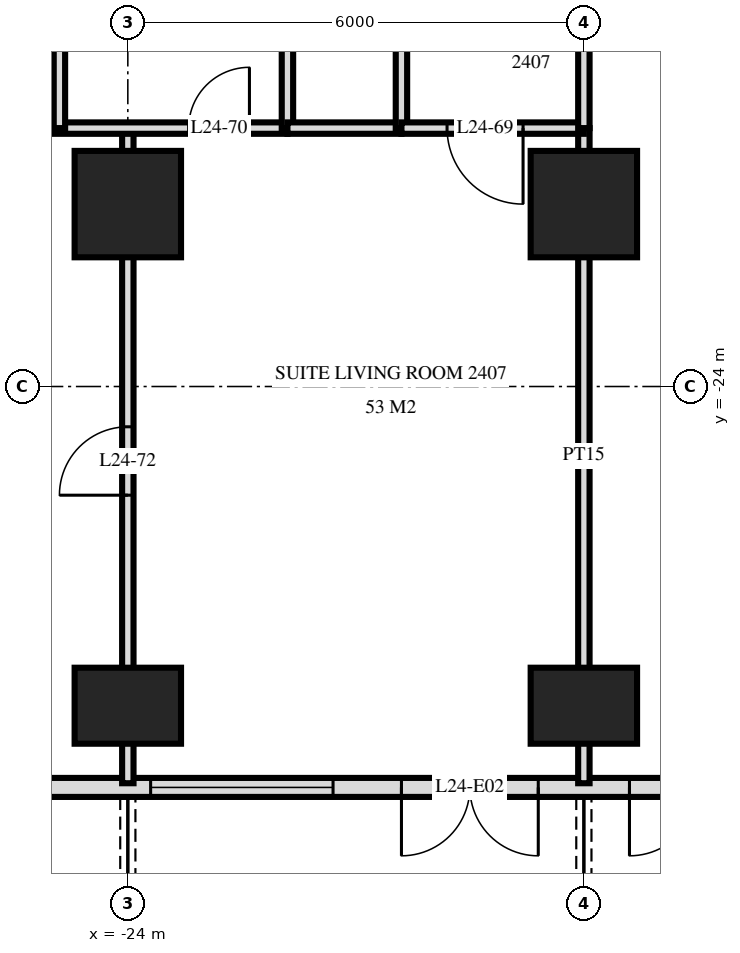
"""IFC4 building model, lengths in metres.
Left out: names, types, materials, properties, quantities, classifications, styles, units other than length and angle.
Written with IfcOpenShell. Run it as: python <this file> out.ifc"""

import sys

from ifc_helpers import new_model, si_unit, direction, frame, frame_2d, origin, origin_2d, place, context, subcontext, project, spatial, rectangle, extrude, element, fill, save


model = new_model("IFC4")
c1 = context("Model", 3, precision=1e-05, world=origin(), true_north=direction((0.0, 1.0)))
c2 = subcontext(c1, "Body", "Model", "MODEL_VIEW")
j1 = project(units=[si_unit("LENGTHUNIT", "METRE"), si_unit("PLANEANGLEUNIT", "RADIAN")], contexts=[c1])
p1 = place(None, origin())
s1 = spatial("IfcSite", under=j1, at=p1, CompositionType="ELEMENT")
p2 = place(p1, origin())
s2 = spatial("IfcBuilding", under=s1, at=p2, CompositionType="ELEMENT")
p3 = place(p2, frame((0.0, 0.0, 96.0)))
s3 = spatial("IfcBuildingStorey", under=s2, at=p3, CompositionType="ELEMENT", Elevation=96.0)
p4 = place(p3, frame((-24.0, -28.2, 0.0), z_axis=(0.0, 0.0, 1.0), x_axis=(1.0, 0.0, 0.0)))
e1 = element("IfcColumn", 1, at=p4, inside=s3, PredefinedType="COLUMN", context=c2, shape_type="SweptSolid", body=[
    extrude(rectangle(XDim=1.4, YDim=1.0, at=origin_2d()), origin(), (0.0, 0.0, 1.0), 3.6),
])
p5 = place(p3, frame((-24.0, -21.6, 0.0), z_axis=(0.0, 0.0, 1.0), x_axis=(1.0, 0.0, 0.0)))
e2 = element("IfcColumn", 2, at=p5, inside=s3, PredefinedType="COLUMN", context=c2, shape_type="SweptSolid", body=[
    extrude(rectangle(XDim=1.4, YDim=1.4, at=origin_2d()), origin(), (0.0, 0.0, 1.0), 3.6),
])
p6 = place(p3, frame((-18.0, -28.2, 0.0), z_axis=(0.0, 0.0, 1.0), x_axis=(1.0, 0.0, 0.0)))
e3 = element("IfcColumn", 3, at=p6, inside=s3, PredefinedType="COLUMN", context=c2, shape_type="SweptSolid", body=[
    extrude(rectangle(XDim=1.4, YDim=1.0, at=origin_2d()), origin(), (0.0, 0.0, 1.0), 3.6),
])
p7 = place(p3, frame((-18.0, -21.6, 0.0), z_axis=(0.0, 0.0, 1.0), x_axis=(1.0, 0.0, 0.0)))
e4 = element("IfcColumn", 4, at=p7, inside=s3, PredefinedType="COLUMN", context=c2, shape_type="SweptSolid", body=[
    extrude(rectangle(XDim=1.4, YDim=1.4, at=origin_2d()), origin(), (0.0, 0.0, 1.0), 3.6),
])
p8 = place(p3, frame((-28.775, -29.275, 0.0), z_axis=(0.0, 0.0, 1.0), x_axis=(1.0, 0.0, 0.0)))
e5 = element("IfcWall", 5, at=p8, inside=s3, PredefinedType="SOLIDWALL", context=c2, shape_type="SweptSolid", body=[
    extrude(rectangle(XDim=57.551, YDim=0.25, at=frame_2d((28.775, 0.0))), origin(), (0.0, 0.0, 1.0), 3.32),
])
p9 = place(p8, frame((0.575, 0.0, 0.0)))
e6 = element("IfcOpeningElement", 6, at=p9, cuts=e5, PredefinedType="OPENING", context=c2, shape_type="SweptSolid", body=[
    extrude(rectangle(XDim=1.8, YDim=2.4, at=frame_2d((0.9, 1.2))), frame((0.0, 0.135, 0.0), z_axis=(0.0, -1.0, 0.0), x_axis=(1.0, 0.0, 0.0)), (0.0, 0.0, 1.0), 0.27),
])
p10 = place(p8, frame((5.075, 0.0, 0.3)))
e7 = element("IfcOpeningElement", 7, at=p10, cuts=e5, PredefinedType="OPENING", context=c2, shape_type="SweptSolid", body=[
    extrude(rectangle(XDim=2.4, YDim=2.1, at=frame_2d((1.2, 1.05))), frame((0.0, 0.135, 0.0), z_axis=(0.0, -1.0, 0.0), x_axis=(1.0, 0.0, 0.0)), (0.0, 0.0, 1.0), 0.27),
])
p11 = place(p8, frame((8.375, 0.0, 0.0)))
e8 = element("IfcOpeningElement", 8, at=p11, cuts=e5, PredefinedType="OPENING", context=c2, shape_type="SweptSolid", body=[
    extrude(rectangle(XDim=1.8, YDim=2.4, at=frame_2d((0.9, 1.2))), frame((0.0, 0.135, 0.0), z_axis=(0.0, -1.0, 0.0), x_axis=(1.0, 0.0, 0.0)), (0.0, 0.0, 1.0), 0.27),
])
p12 = place(p8, frame((11.375, 0.0, 0.0)))
e9 = element("IfcOpeningElement", 9, at=p12, cuts=e5, PredefinedType="OPENING", context=c2, shape_type="SweptSolid", body=[
    extrude(rectangle(XDim=1.8, YDim=2.4, at=frame_2d((0.9, 1.2))), frame((0.0, 0.135, 0.0), z_axis=(0.0, -1.0, 0.0), x_axis=(1.0, 0.0, 0.0)), (0.0, 0.0, 1.0), 0.27),
])
p13 = place(p8, frame((14.075, 0.0, 0.3)))
e10 = element("IfcOpeningElement", 10, at=p13, cuts=e5, PredefinedType="OPENING", context=c2, shape_type="SweptSolid", body=[
    extrude(rectangle(XDim=2.4, YDim=2.1, at=frame_2d((1.2, 1.05))), frame((0.0, 0.135, 0.0), z_axis=(0.0, -1.0, 0.0), x_axis=(1.0, 0.0, 0.0)), (0.0, 0.0, 1.0), 0.27),
])
p14 = place(p8, frame((17.375, 0.0, 0.0)))
e11 = element("IfcOpeningElement", 11, at=p14, cuts=e5, PredefinedType="OPENING", context=c2, shape_type="SweptSolid", body=[
    extrude(rectangle(XDim=1.8, YDim=2.4, at=frame_2d((0.9, 1.2))), frame((0.0, 0.135, 0.0), z_axis=(0.0, -1.0, 0.0), x_axis=(1.0, 0.0, 0.0)), (0.0, 0.0, 1.0), 0.27),
])
p15 = place(p8, frame((20.075, 0.0, 0.3)))
e12 = element("IfcOpeningElement", 12, at=p15, cuts=e5, PredefinedType="OPENING", context=c2, shape_type="SweptSolid", body=[
    extrude(rectangle(XDim=2.4, YDim=2.1, at=frame_2d((1.2, 1.05))), frame((0.0, 0.135, 0.0), z_axis=(0.0, -1.0, 0.0), x_axis=(1.0, 0.0, 0.0)), (0.0, 0.0, 1.0), 0.27),
])
p16 = place(p8, frame((23.075, 0.0, 0.3)))
e13 = element("IfcOpeningElement", 13, at=p16, cuts=e5, PredefinedType="OPENING", context=c2, shape_type="SweptSolid", body=[
    extrude(rectangle(XDim=2.4, YDim=2.1, at=frame_2d((1.2, 1.05))), frame((0.0, 0.135, 0.0), z_axis=(0.0, -1.0, 0.0), x_axis=(1.0, 0.0, 0.0)), (0.0, 0.0, 1.0), 0.27),
])
p17 = place(p8, frame((26.375, 0.0, 0.0)))
e14 = element("IfcOpeningElement", 14, at=p17, cuts=e5, PredefinedType="OPENING", context=c2, shape_type="SweptSolid", body=[
    extrude(rectangle(XDim=1.8, YDim=2.4, at=frame_2d((0.9, 1.2))), frame((0.0, 0.135, 0.0), z_axis=(0.0, -1.0, 0.0), x_axis=(1.0, 0.0, 0.0)), (0.0, 0.0, 1.0), 0.27),
])
p18 = place(p8, frame((29.375, 0.0, 0.0)))
e15 = element("IfcOpeningElement", 15, at=p18, cuts=e5, PredefinedType="OPENING", context=c2, shape_type="SweptSolid", body=[
    extrude(rectangle(XDim=1.8, YDim=2.4, at=frame_2d((0.9, 1.2))), frame((0.0, 0.135, 0.0), z_axis=(0.0, -1.0, 0.0), x_axis=(1.0, 0.0, 0.0)), (0.0, 0.0, 1.0), 0.27),
])
p19 = place(p8, frame((32.075, 0.0, 0.3)))
e16 = element("IfcOpeningElement", 16, at=p19, cuts=e5, PredefinedType="OPENING", context=c2, shape_type="SweptSolid", body=[
    extrude(rectangle(XDim=2.4, YDim=2.1, at=frame_2d((1.2, 1.05))), frame((0.0, 0.135, 0.0), z_axis=(0.0, -1.0, 0.0), x_axis=(1.0, 0.0, 0.0)), (0.0, 0.0, 1.0), 0.27),
])
p20 = place(p8, frame((35.375, 0.0, 0.0)))
e17 = element("IfcOpeningElement", 17, at=p20, cuts=e5, PredefinedType="OPENING", context=c2, shape_type="SweptSolid", body=[
    extrude(rectangle(XDim=1.8, YDim=2.4, at=frame_2d((0.9, 1.2))), frame((0.0, 0.135, 0.0), z_axis=(0.0, -1.0, 0.0), x_axis=(1.0, 0.0, 0.0)), (0.0, 0.0, 1.0), 0.27),
])
p21 = place(p8, frame((38.075, 0.0, 0.3)))
e18 = element("IfcOpeningElement", 18, at=p21, cuts=e5, PredefinedType="OPENING", context=c2, shape_type="SweptSolid", body=[
    extrude(rectangle(XDim=2.4, YDim=2.1, at=frame_2d((1.2, 1.05))), frame((0.0, 0.135, 0.0), z_axis=(0.0, -1.0, 0.0), x_axis=(1.0, 0.0, 0.0)), (0.0, 0.0, 1.0), 0.27),
])
p22 = place(p8, frame((41.075, 0.0, 0.3)))
e19 = element("IfcOpeningElement", 19, at=p22, cuts=e5, PredefinedType="OPENING", context=c2, shape_type="SweptSolid", body=[
    extrude(rectangle(XDim=2.4, YDim=2.1, at=frame_2d((1.2, 1.05))), frame((0.0, 0.135, 0.0), z_axis=(0.0, -1.0, 0.0), x_axis=(1.0, 0.0, 0.0)), (0.0, 0.0, 1.0), 0.27),
])
p23 = place(p8, frame((44.375, 0.0, 0.0)))
e20 = element("IfcOpeningElement", 20, at=p23, cuts=e5, PredefinedType="OPENING", context=c2, shape_type="SweptSolid", body=[
    extrude(rectangle(XDim=1.8, YDim=2.4, at=frame_2d((0.9, 1.2))), frame((0.0, 0.135, 0.0), z_axis=(0.0, -1.0, 0.0), x_axis=(1.0, 0.0, 0.0)), (0.0, 0.0, 1.0), 0.27),
])
p24 = place(p8, frame((47.075, 0.0, 0.3)))
e21 = element("IfcOpeningElement", 21, at=p24, cuts=e5, PredefinedType="OPENING", context=c2, shape_type="SweptSolid", body=[
    extrude(rectangle(XDim=2.4, YDim=2.1, at=frame_2d((1.2, 1.05))), frame((0.0, 0.135, 0.0), z_axis=(0.0, -1.0, 0.0), x_axis=(1.0, 0.0, 0.0)), (0.0, 0.0, 1.0), 0.27),
])
p25 = place(p8, frame((50.375, 0.0, 0.0)))
e22 = element("IfcOpeningElement", 22, at=p25, cuts=e5, PredefinedType="OPENING", context=c2, shape_type="SweptSolid", body=[
    extrude(rectangle(XDim=1.8, YDim=2.4, at=frame_2d((0.9, 1.2))), frame((0.0, 0.135, 0.0), z_axis=(0.0, -1.0, 0.0), x_axis=(1.0, 0.0, 0.0)), (0.0, 0.0, 1.0), 0.27),
])
p26 = place(p8, frame((53.375, 0.0, 0.0)))
e23 = element("IfcOpeningElement", 23, at=p26, cuts=e5, PredefinedType="OPENING", context=c2, shape_type="SweptSolid", body=[
    extrude(rectangle(XDim=1.8, YDim=2.4, at=frame_2d((0.9, 1.2))), frame((0.0, 0.135, 0.0), z_axis=(0.0, -1.0, 0.0), x_axis=(1.0, 0.0, 0.0)), (0.0, 0.0, 1.0), 0.27),
])
p27 = place(p3, frame((-18.0, -20.6, 0.0), z_axis=(0.0, 0.0, 1.0), x_axis=(0.0, 1.0, 0.0)))
e24 = element("IfcWall", 24, at=p27, inside=s3, PredefinedType="PARTITIONING", context=c2, shape_type="SweptSolid", body=[
    extrude(rectangle(XDim=3.6, YDim=0.15, at=frame_2d((1.8, 0.0))), origin(), (0.0, 0.0, 1.0), 3.32),
])
p28 = place(p3, frame((-18.0, -29.22, 0.0), z_axis=(0.0, 0.0, 1.0), x_axis=(0.0, 1.0, 0.0)))
e25 = element("IfcWall", 25, at=p28, inside=s3, PredefinedType="PARTITIONING", context=c2, shape_type="SweptSolid", body=[
    extrude(rectangle(XDim=8.62, YDim=0.15, at=frame_2d((4.31, 0.0))), origin(), (0.0, 0.0, 1.0), 3.32),
])
p29 = place(p3, frame((-20.4, -20.6, 0.0), z_axis=(0.0, 0.0, 1.0), x_axis=(0.0, 1.0, 0.0)))
e26 = element("IfcWall", 26, at=p29, inside=s3, PredefinedType="PARTITIONING", context=c2, shape_type="SweptSolid", body=[
    extrude(rectangle(XDim=3.6, YDim=0.15, at=frame_2d((1.8, 0.0))), origin(), (0.0, 0.0, 1.0), 3.32),
])
p30 = place(p29, frame((1.3, 0.0, 0.0)))
e27 = element("IfcOpeningElement", 27, at=p30, cuts=e26, PredefinedType="OPENING", context=c2, shape_type="SweptSolid", body=[
    extrude(rectangle(XDim=1.0, YDim=2.1, at=frame_2d((0.5, 1.05))), frame((0.0, 0.085, 0.0), z_axis=(0.0, -1.0, 0.0), x_axis=(1.0, 0.0, 0.0)), (0.0, 0.0, 1.0), 0.17),
])
p31 = place(p3, frame((-21.9, -20.6, 0.0), z_axis=(0.0, 0.0, 1.0), x_axis=(0.0, 1.0, 0.0)))
e28 = element("IfcWall", 28, at=p31, inside=s3, PredefinedType="PLUMBINGWALL", context=c2, shape_type="SweptSolid", body=[
    extrude(rectangle(XDim=3.6, YDim=0.15, at=frame_2d((1.8, 0.0))), origin(), (0.0, 0.0, 1.0), 3.32),
])
p32 = place(p3, frame((-24.0, -29.22, 0.0), z_axis=(0.0, 0.0, 1.0), x_axis=(0.0, 1.0, 0.0)))
e29 = element("IfcWall", 29, at=p32, inside=s3, PredefinedType="PARTITIONING", context=c2, shape_type="SweptSolid", body=[
    extrude(rectangle(XDim=8.62, YDim=0.15, at=frame_2d((4.31, 0.0))), origin(), (0.0, 0.0, 1.0), 3.32),
])
p33 = place(p32, frame((3.79, 0.0, 0.0)))
e30 = element("IfcOpeningElement", 30, at=p33, cuts=e29, PredefinedType="OPENING", context=c2, shape_type="SweptSolid", body=[
    extrude(rectangle(XDim=0.9, YDim=2.1, at=frame_2d((0.45, 1.05))), frame((0.0, 0.085, 0.0), z_axis=(0.0, -1.0, 0.0), x_axis=(1.0, 0.0, 0.0)), (0.0, 0.0, 1.0), 0.17),
])
p34 = place(p3, frame((-24.9, -20.6, 0.0), z_axis=(0.0, 0.0, 1.0), x_axis=(0.0, 1.0, 0.0)))
e31 = element("IfcWall", 31, at=p34, inside=s3, PredefinedType="PARTITIONING", context=c2, shape_type="SweptSolid", body=[
    extrude(rectangle(XDim=3.6, YDim=0.15, at=frame_2d((1.8, 0.0))), origin(), (0.0, 0.0, 1.0), 3.32),
])
p35 = place(p3, frame((-20.4, -20.6, 0.0), z_axis=(0.0, 0.0, 1.0), x_axis=(1.0, 0.0, 0.0)))
e32 = element("IfcWall", 32, at=p35, inside=s3, PredefinedType="PARTITIONING", context=c2, shape_type="SweptSolid", body=[
    extrude(rectangle(XDim=2.4, YDim=0.15, at=frame_2d((1.2, 0.0))), origin(), (0.0, 0.0, 1.0), 3.32),
])
p36 = place(p35, frame((0.6, 0.0, 0.0)))
e33 = element("IfcOpeningElement", 33, at=p36, cuts=e32, PredefinedType="OPENING", context=c2, shape_type="SweptSolid", body=[
    extrude(rectangle(XDim=1.0, YDim=2.1, at=frame_2d((0.5, 1.05))), frame((0.0, 0.085, 0.0), z_axis=(0.0, -1.0, 0.0), x_axis=(1.0, 0.0, 0.0)), (0.0, 0.0, 1.0), 0.17),
])
p37 = place(p3, frame((-33.12, -20.6, 0.0), z_axis=(0.0, 0.0, 1.0), x_axis=(1.0, 0.0, 0.0)))
e34 = element("IfcWall", 34, at=p37, inside=s3, PredefinedType="PARTITIONING", context=c2, shape_type="SweptSolid", body=[
    extrude(rectangle(XDim=11.22, YDim=0.15, at=frame_2d((5.61, 0.0))), origin(), (0.0, 0.0, 1.0), 3.32),
])
p38 = place(p37, frame((9.92, 0.0, 0.0)))
e35 = element("IfcOpeningElement", 35, at=p38, cuts=e34, PredefinedType="OPENING", context=c2, shape_type="SweptSolid", body=[
    extrude(rectangle(XDim=0.8, YDim=2.1, at=frame_2d((0.4, 1.05))), frame((0.0, 0.085, 0.0), z_axis=(0.0, -1.0, 0.0), x_axis=(1.0, 0.0, 0.0)), (0.0, 0.0, 1.0), 0.17),
])
p39 = place(p37, frame((3.92, 0.0, 0.0)))
e36 = element("IfcOpeningElement", 36, at=p39, cuts=e34, PredefinedType="OPENING", context=c2, shape_type="SweptSolid", body=[
    extrude(rectangle(XDim=0.9, YDim=2.1, at=frame_2d((0.45, 1.05))), frame((0.0, 0.085, 0.0), z_axis=(0.0, -1.0, 0.0), x_axis=(1.0, 0.0, 0.0)), (0.0, 0.0, 1.0), 0.17),
])
p40 = place(p3, frame((-21.9, -20.6, 0.0), z_axis=(0.0, 0.0, 1.0), x_axis=(1.0, 0.0, 0.0)))
e37 = element("IfcWall", 37, at=p40, inside=s3, PredefinedType="PLUMBINGWALL", context=c2, shape_type="SweptSolid", body=[
    extrude(rectangle(XDim=1.5, YDim=0.15, at=frame_2d((0.75, 0.0))), origin(), (0.0, 0.0, 1.0), 3.32),
])
p41 = place(p10, origin())
e38 = element("IfcWindow", 38, at=p41, inside=s3, PartitioningType="SINGLE_PANEL", PredefinedType="WINDOW", context=c2, shape_type="SweptSolid", body=[
    extrude(rectangle(XDim=2.4, YDim=2.1, at=frame_2d((1.2, 1.05))), frame((0.0, 0.03, 0.0), z_axis=(0.0, -1.0, 0.0), x_axis=(1.0, 0.0, 0.0)), (0.0, 0.0, 1.0), 0.06),
])
fill(e7, e38)
p42 = place(p11, frame((0.9, 0.0, 0.0), z_axis=(0.0, 0.0, 1.0), x_axis=(-1.0, 0.0, 0.0)))
e39 = element("IfcDoor", 39, at=p42, inside=s3, OperationType="DOUBLE_DOOR_SINGLE_SWING", PredefinedType="DOOR", context=c2, shape_type="SweptSolid", body=[
    extrude(rectangle(XDim=1.8, YDim=2.4, at=frame_2d((0.0, 1.2))), frame((0.0, -0.025, 0.0), z_axis=(0.0, 1.0, 0.0), x_axis=(-1.0, 0.0, 0.0)), (0.0, 0.0, 1.0), 0.05),
])
fill(e8, e39)
p43 = place(p12, frame((0.9, 0.0, 0.0), z_axis=(0.0, 0.0, 1.0), x_axis=(-1.0, 0.0, 0.0)))
e40 = element("IfcDoor", 40, at=p43, inside=s3, OperationType="DOUBLE_DOOR_SINGLE_SWING", PredefinedType="DOOR", context=c2, shape_type="SweptSolid", body=[
    extrude(rectangle(XDim=1.8, YDim=2.4, at=frame_2d((0.0, 1.2))), frame((0.0, -0.025, 0.0), z_axis=(0.0, 1.0, 0.0), x_axis=(-1.0, 0.0, 0.0)), (0.0, 0.0, 1.0), 0.05),
])
fill(e9, e40)
p44 = place(p36, frame((0.5, 0.0, 0.0), z_axis=(0.0, 0.0, 1.0), x_axis=(-1.0, 0.0, 0.0)))
e41 = element("IfcDoor", 41, at=p44, inside=s3, OperationType="SINGLE_SWING_RIGHT", PredefinedType="DOOR", context=c2, shape_type="SweptSolid", body=[
    extrude(rectangle(XDim=1.0, YDim=2.1, at=frame_2d((0.0, 1.05))), frame((0.0, -0.025, 0.0), z_axis=(0.0, 1.0, 0.0), x_axis=(-1.0, 0.0, 0.0)), (0.0, 0.0, 1.0), 0.05),
])
fill(e33, e41)
p45 = place(p38, origin())
e42 = element("IfcDoor", 42, at=p45, inside=s3, OperationType="SINGLE_SWING_LEFT", PredefinedType="DOOR", context=c2, shape_type="SweptSolid", body=[
    extrude(rectangle(XDim=0.8, YDim=2.1, at=frame_2d((0.4, 1.05))), frame((0.0, 0.025, 0.0), z_axis=(0.0, -1.0, 0.0), x_axis=(1.0, 0.0, 0.0)), (0.0, 0.0, 1.0), 0.05),
])
fill(e35, e42)
p46 = place(p33, origin())
e43 = element("IfcDoor", 43, at=p46, inside=s3, OperationType="SINGLE_SWING_RIGHT", PredefinedType="DOOR", context=c2, shape_type="SweptSolid", body=[
    extrude(rectangle(XDim=0.9, YDim=2.1, at=frame_2d((0.45, 1.05))), frame((0.0, 0.025, 0.0), z_axis=(0.0, -1.0, 0.0), x_axis=(1.0, 0.0, 0.0)), (0.0, 0.0, 1.0), 0.05),
])
fill(e30, e43)
save(model, sys.argv[1])
